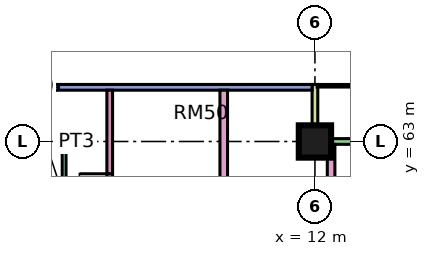
"""IFC4 building model, lengths in metres.
Left out: names, types, materials, properties, quantities, classifications, styles, units other than length and angle.
Written with IfcOpenShell. Run it as: python <this file> out.ifc"""

import sys

from ifc_helpers import new_model, si_unit, direction, frame, frame_2d, origin, origin_2d, place, context, subcontext, project, spatial, rectangle, extrude, element, fill, save


model = new_model("IFC4")
c1 = context("Model", 3, precision=1e-05, world=origin(), true_north=direction((0.0, 1.0)))
c2 = subcontext(c1, "Body", "Model", "MODEL_VIEW")
j1 = project(units=[si_unit("LENGTHUNIT", "METRE"), si_unit("PLANEANGLEUNIT", "RADIAN")], contexts=[c1])
p1 = place(None, origin())
s1 = spatial("IfcSite", under=j1, at=p1, CompositionType="ELEMENT")
p2 = place(p1, origin())
s2 = spatial("IfcBuilding", under=s1, at=p2, CompositionType="ELEMENT")
p3 = place(p2, frame((0.0, 0.0, 245.4)))
s3 = spatial("IfcBuildingStorey", under=s2, at=p3, CompositionType="ELEMENT", Elevation=245.4)
p4 = place(p3, frame((12.0, 63.0, 0.0), z_axis=(0.0, 0.0, 1.0), x_axis=(1.0, 0.0, 0.0)))
e1 = element("IfcColumn", 1, at=p4, inside=s3, PredefinedType="COLUMN", context=c2, shape_type="SweptSolid", body=[
    extrude(rectangle(XDim=0.85, YDim=0.85, at=origin_2d()), origin(), (0.0, 0.0, 1.0), 3.75),
])
p5 = place(p3, frame((22.425, 63.0, 0.0), z_axis=(0.0, 0.0, 1.0), x_axis=(-1.0, 0.0, 0.0)))
e2 = element("IfcWall", 2, at=p5, inside=s3, PredefinedType="SOLIDWALL", context=c2, shape_type="SweptSolid", body=[
    extrude(rectangle(XDim=10.35, YDim=0.15, at=frame_2d((5.175, 0.0))), origin(), (0.0, 0.0, 1.0), 3.35),
])
p6 = place(p5, frame((1.7, 0.0, 0.0)))
e3 = element("IfcOpeningElement", 3, at=p6, cuts=e2, PredefinedType="OPENING", context=c2, shape_type="SweptSolid", body=[
    extrude(rectangle(XDim=1.8, YDim=2.4, at=frame_2d((0.9, 1.2))), frame((0.0, 0.085, 0.0), z_axis=(0.0, -1.0, 0.0), x_axis=(1.0, 0.0, 0.0)), (0.0, 0.0, 1.0), 0.17),
])
p7 = place(p5, frame((6.05, 0.0, 0.45)))
e4 = element("IfcOpeningElement", 4, at=p7, cuts=e2, PredefinedType="OPENING", context=c2, shape_type="SweptSolid", body=[
    extrude(rectangle(XDim=3.0, YDim=2.4, at=frame_2d((1.5, 1.2))), frame((0.0, 0.085, 0.0), z_axis=(0.0, -1.0, 0.0), x_axis=(1.0, 0.0, 0.0)), (0.0, 0.0, 1.0), 0.17),
])
p8 = place(p3, frame((12.0, 64.5, 0.0), z_axis=(0.0, 0.0, 1.0), x_axis=(0.0, -1.0, 0.0)))
e5 = element("IfcWall", 5, at=p8, inside=s3, PredefinedType="SOLIDWALL", context=c2, shape_type="SweptSolid", body=[
    extrude(rectangle(XDim=1.5, YDim=0.15, at=frame_2d((0.75, 0.0))), origin(), (0.0, 0.0, 1.0), 3.35),
])
p9 = place(p3, frame((11.925, 64.425, 0.0), z_axis=(0.0, 0.0, 1.0), x_axis=(-1.0, 0.0, 0.0)))
e6 = element("IfcWall", 6, at=p9, inside=s3, PredefinedType="SOLIDWALL", context=c2, shape_type="SweptSolid", body=[
    extrude(rectangle(XDim=10.425, YDim=0.15, at=frame_2d((5.212, 0.0))), origin(), (0.0, 0.0, 1.0), 3.35),
])
p10 = place(p9, frame((6.675, 0.0, 0.45)))
e7 = element("IfcOpeningElement", 7, at=p10, cuts=e6, PredefinedType="OPENING", context=c2, shape_type="SweptSolid", body=[
    extrude(rectangle(XDim=3.0, YDim=2.4, at=frame_2d((1.5, 1.2))), frame((0.0, 0.085, 0.0), z_axis=(0.0, -1.0, 0.0), x_axis=(1.0, 0.0, 0.0)), (0.0, 0.0, 1.0), 0.17),
])
p11 = place(p3, frame((5.4, 36.1, 0.0), z_axis=(0.0, 0.0, 1.0), x_axis=(0.0, 1.0, 0.0)))
e8 = element("IfcWall", 8, at=p11, inside=s3, PredefinedType="PARTITIONING", context=c2, shape_type="SweptSolid", body=[
    extrude(rectangle(XDim=26.95, YDim=0.1, at=frame_2d((13.475, 0.0))), origin(), (0.0, 0.0, 1.0), 3.35),
])
p12 = place(p11, frame((0.95, 0.0, 0.0)))
e9 = element("IfcOpeningElement", 9, at=p12, cuts=e8, PredefinedType="OPENING", context=c2, shape_type="SweptSolid", body=[
    extrude(rectangle(XDim=0.9, YDim=2.1, at=frame_2d((0.45, 1.05))), frame((0.0, 0.06, 0.0), z_axis=(0.0, -1.0, 0.0), x_axis=(1.0, 0.0, 0.0)), (0.0, 0.0, 1.0), 0.12),
])
p13 = place(p11, frame((3.95, 0.0, 0.0)))
e10 = element("IfcOpeningElement", 10, at=p13, cuts=e8, PredefinedType="OPENING", context=c2, shape_type="SweptSolid", body=[
    extrude(rectangle(XDim=0.9, YDim=2.1, at=frame_2d((0.45, 1.05))), frame((0.0, 0.06, 0.0), z_axis=(0.0, -1.0, 0.0), x_axis=(1.0, 0.0, 0.0)), (0.0, 0.0, 1.0), 0.12),
])
p14 = place(p11, frame((6.95, 0.0, 0.0)))
e11 = element("IfcOpeningElement", 11, at=p14, cuts=e8, PredefinedType="OPENING", context=c2, shape_type="SweptSolid", body=[
    extrude(rectangle(XDim=0.9, YDim=2.1, at=frame_2d((0.45, 1.05))), frame((0.0, 0.06, 0.0), z_axis=(0.0, -1.0, 0.0), x_axis=(1.0, 0.0, 0.0)), (0.0, 0.0, 1.0), 0.12),
])
p15 = place(p11, frame((9.95, 0.0, 0.0)))
e12 = element("IfcOpeningElement", 12, at=p15, cuts=e8, PredefinedType="OPENING", context=c2, shape_type="SweptSolid", body=[
    extrude(rectangle(XDim=0.9, YDim=2.1, at=frame_2d((0.45, 1.05))), frame((0.0, 0.06, 0.0), z_axis=(0.0, -1.0, 0.0), x_axis=(1.0, 0.0, 0.0)), (0.0, 0.0, 1.0), 0.12),
])
p16 = place(p11, frame((21.95, 0.0, 0.0)))
e13 = element("IfcOpeningElement", 13, at=p16, cuts=e8, PredefinedType="OPENING", context=c2, shape_type="SweptSolid", body=[
    extrude(rectangle(XDim=0.9, YDim=2.1, at=frame_2d((0.45, 1.05))), frame((0.0, 0.06, 0.0), z_axis=(0.0, -1.0, 0.0), x_axis=(1.0, 0.0, 0.0)), (0.0, 0.0, 1.0), 0.12),
])
p17 = place(p11, frame((24.95, 0.0, 0.0)))
e14 = element("IfcOpeningElement", 14, at=p17, cuts=e8, PredefinedType="OPENING", context=c2, shape_type="SweptSolid", body=[
    extrude(rectangle(XDim=0.9, YDim=2.1, at=frame_2d((0.45, 1.05))), frame((0.0, 0.06, 0.0), z_axis=(0.0, -1.0, 0.0), x_axis=(1.0, 0.0, 0.0)), (0.0, 0.0, 1.0), 0.12),
])
p18 = place(p11, frame((15.95, 0.0, 0.0)))
e15 = element("IfcOpeningElement", 15, at=p18, cuts=e8, PredefinedType="OPENING", context=c2, shape_type="SweptSolid", body=[
    extrude(rectangle(XDim=0.9, YDim=2.1, at=frame_2d((0.45, 1.05))), frame((0.0, 0.06, 0.0), z_axis=(0.0, -1.0, 0.0), x_axis=(1.0, 0.0, 0.0)), (0.0, 0.0, 1.0), 0.12),
])
p19 = place(p3, frame((5.45, 63.0, 0.0), z_axis=(0.0, 0.0, 1.0), x_axis=(1.0, 0.0, 0.0)))
e16 = element("IfcWall", 16, at=p19, inside=s3, PredefinedType="PARTITIONING", context=c2, shape_type="SweptSolid", body=[
    extrude(rectangle(XDim=0.55, YDim=0.1, at=frame_2d((0.275, 0.0))), origin(), (0.0, 0.0, 1.0), 3.35),
])
p20 = place(p3, frame((6.6, 50.35, 0.0), z_axis=(0.0, 0.0, 1.0), x_axis=(0.0, 1.0, 0.0)))
e17 = element("IfcWall", 17, at=p20, inside=s3, PredefinedType="PARTITIONING", context=c2, shape_type="SweptSolid", body=[
    extrude(rectangle(XDim=14.0, YDim=0.15, at=frame_2d((7.0, 0.0))), origin(), (0.0, 0.0, 1.0), 3.35),
])
p21 = place(p20, frame((11.0, 0.0, 0.0)))
e18 = element("IfcOpeningElement", 18, at=p21, cuts=e17, PredefinedType="OPENING", context=c2, shape_type="SweptSolid", body=[
    extrude(rectangle(XDim=0.8, YDim=2.1, at=frame_2d((0.4, 1.05))), frame((0.0, 0.085, 0.0), z_axis=(0.0, -1.0, 0.0), x_axis=(1.0, 0.0, 0.0)), (0.0, 0.0, 1.0), 0.17),
])
p22 = place(p20, frame((4.25, 0.0, 0.0)))
e19 = element("IfcOpeningElement", 19, at=p22, cuts=e17, PredefinedType="OPENING", context=c2, shape_type="SweptSolid", body=[
    extrude(rectangle(XDim=0.8, YDim=2.1, at=frame_2d((0.4, 1.05))), frame((0.0, 0.085, 0.0), z_axis=(0.0, -1.0, 0.0), x_axis=(1.0, 0.0, 0.0)), (0.0, 0.0, 1.0), 0.17),
])
p23 = place(p20, frame((7.7, 0.0, 0.0)))
e20 = element("IfcOpeningElement", 20, at=p23, cuts=e17, PredefinedType="OPENING", context=c2, shape_type="SweptSolid", body=[
    extrude(rectangle(XDim=0.8, YDim=2.1, at=frame_2d((0.4, 1.05))), frame((0.0, 0.085, 0.0), z_axis=(0.0, -1.0, 0.0), x_axis=(1.0, 0.0, 0.0)), (0.0, 0.0, 1.0), 0.17),
])
p24 = place(p3, frame((9.6, 20.0, 0.0), z_axis=(0.0, 0.0, 1.0), x_axis=(0.0, 1.0, 0.0)))
e21 = element("IfcWall", 21, at=p24, inside=s3, PredefinedType="PARTITIONING", context=c2, shape_type="SweptSolid", body=[
    extrude(rectangle(XDim=44.35, YDim=0.2, at=frame_2d((22.175, 0.0))), origin(), (0.0, 0.0, 1.0), 3.35),
])
p25 = place(p24, frame((28.8, 0.0, 0.0)))
e22 = element("IfcOpeningElement", 22, at=p25, cuts=e21, PredefinedType="OPENING", context=c2, shape_type="SweptSolid", body=[
    extrude(rectangle(XDim=1.0, YDim=2.1, at=frame_2d((0.5, 1.05))), frame((0.0, 0.11, 0.0), z_axis=(0.0, -1.0, 0.0), x_axis=(1.0, 0.0, 0.0)), (0.0, 0.0, 1.0), 0.22),
])
p26 = place(p24, frame((0.6, 0.0, 0.0)))
e23 = element("IfcOpeningElement", 23, at=p26, cuts=e21, PredefinedType="OPENING", context=c2, shape_type="SweptSolid", body=[
    extrude(rectangle(XDim=1.2, YDim=2.1, at=frame_2d((0.6, 1.05))), frame((0.0, 0.11, 0.0), z_axis=(0.0, -1.0, 0.0), x_axis=(1.0, 0.0, 0.0)), (0.0, 0.0, 1.0), 0.22),
])
p27 = place(p24, frame((3.9, 0.0, 0.0)))
e24 = element("IfcOpeningElement", 24, at=p27, cuts=e21, PredefinedType="OPENING", context=c2, shape_type="SweptSolid", body=[
    extrude(rectangle(XDim=1.0, YDim=2.1, at=frame_2d((0.5, 1.05))), frame((0.0, 0.11, 0.0), z_axis=(0.0, -1.0, 0.0), x_axis=(1.0, 0.0, 0.0)), (0.0, 0.0, 1.0), 0.22),
])
p28 = place(p3, frame((12.425, 20.0, 0.0), z_axis=(0.0, 0.0, 1.0), x_axis=(0.0, 1.0, 0.0)))
e25 = element("IfcWall", 25, at=p28, inside=s3, PredefinedType="PARTITIONING", context=c2, shape_type="SweptSolid", body=[
    extrude(rectangle(XDim=42.926, YDim=0.2, at=frame_2d((21.463, 0.0))), origin(), (0.0, 0.0, 1.0), 3.35),
])
p29 = place(p28, frame((7.0, 0.0, 0.0)))
e26 = element("IfcOpeningElement", 26, at=p29, cuts=e25, PredefinedType="OPENING", context=c2, shape_type="SweptSolid", body=[
    extrude(rectangle(XDim=1.0, YDim=2.1, at=frame_2d((0.5, 1.05))), frame((0.0, 0.11, 0.0), z_axis=(0.0, -1.0, 0.0), x_axis=(1.0, 0.0, 0.0)), (0.0, 0.0, 1.0), 0.22),
])
p30 = place(p28, frame((12.95, 0.0, 0.0)))
e27 = element("IfcOpeningElement", 27, at=p30, cuts=e25, PredefinedType="OPENING", context=c2, shape_type="SweptSolid", body=[
    extrude(rectangle(XDim=1.0, YDim=2.1, at=frame_2d((0.5, 1.05))), frame((0.0, 0.11, 0.0), z_axis=(0.0, -1.0, 0.0), x_axis=(1.0, 0.0, 0.0)), (0.0, 0.0, 1.0), 0.22),
])
p31 = place(p28, frame((16.75, 0.0, 0.0)))
e28 = element("IfcOpeningElement", 28, at=p31, cuts=e25, PredefinedType="OPENING", context=c2, shape_type="SweptSolid", body=[
    extrude(rectangle(XDim=1.0, YDim=2.1, at=frame_2d((0.5, 1.05))), frame((0.0, 0.11, 0.0), z_axis=(0.0, -1.0, 0.0), x_axis=(1.0, 0.0, 0.0)), (0.0, 0.0, 1.0), 0.22),
])
p32 = place(p28, frame((34.9, 0.0, 0.0)))
e29 = element("IfcOpeningElement", 29, at=p32, cuts=e25, PredefinedType="OPENING", context=c2, shape_type="SweptSolid", body=[
    extrude(rectangle(XDim=1.0, YDim=2.1, at=frame_2d((0.5, 1.05))), frame((0.0, 0.11, 0.0), z_axis=(0.0, -1.0, 0.0), x_axis=(1.0, 0.0, 0.0)), (0.0, 0.0, 1.0), 0.22),
])
p33 = place(p28, frame((1.15, 0.0, 0.0)))
e30 = element("IfcOpeningElement", 30, at=p33, cuts=e25, PredefinedType="OPENING", context=c2, shape_type="SweptSolid", body=[
    extrude(rectangle(XDim=1.8, YDim=2.1, at=frame_2d((0.9, 1.05))), frame((0.0, 0.11, 0.0), z_axis=(0.0, -1.0, 0.0), x_axis=(1.0, 0.0, 0.0)), (0.0, 0.0, 1.0), 0.22),
])
p34 = place(p28, frame((28.6, 0.0, 0.0)))
e31 = element("IfcOpeningElement", 31, at=p34, cuts=e25, PredefinedType="OPENING", context=c2, shape_type="SweptSolid", body=[
    extrude(rectangle(XDim=1.8, YDim=2.1, at=frame_2d((0.9, 1.05))), frame((0.0, 0.11, 0.0), z_axis=(0.0, -1.0, 0.0), x_axis=(1.0, 0.0, 0.0)), (0.0, 0.0, 1.0), 0.22),
])
p35 = place(p10, origin())
e32 = element("IfcWindow", 32, at=p35, inside=s3, PartitioningType="SINGLE_PANEL", PredefinedType="WINDOW", context=c2, shape_type="SweptSolid", body=[
    extrude(rectangle(XDim=3.0, YDim=2.4, at=frame_2d((1.5, 1.2))), frame((0.0, 0.03, 0.0), z_axis=(0.0, -1.0, 0.0), x_axis=(1.0, 0.0, 0.0)), (0.0, 0.0, 1.0), 0.06),
])
fill(e7, e32)
p36 = place(p21, frame((0.8, 0.0, 0.0), z_axis=(0.0, 0.0, 1.0), x_axis=(-1.0, 0.0, 0.0)))
e33 = element("IfcDoor", 33, at=p36, inside=s3, OperationType="SINGLE_SWING_RIGHT", PredefinedType="DOOR", context=c2, shape_type="SweptSolid", body=[
    extrude(rectangle(XDim=0.8, YDim=2.1, at=frame_2d((0.4, 1.05))), frame((0.0, 0.025, 0.0), z_axis=(0.0, -1.0, 0.0), x_axis=(1.0, 0.0, 0.0)), (0.0, 0.0, 1.0), 0.05),
])
fill(e18, e33)
save(model, sys.argv[1])
